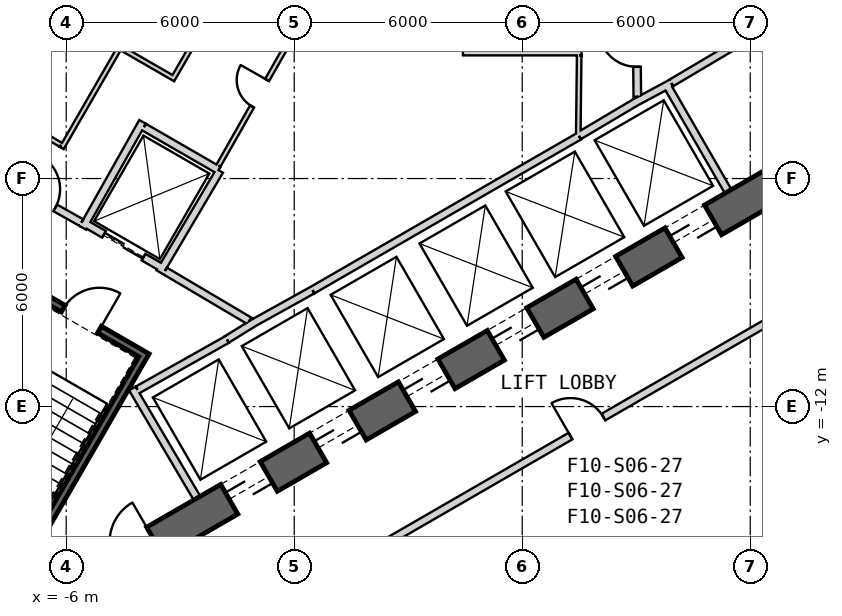
"""IFC4 building model, lengths in metres.
Left out: names, types, materials, properties, quantities, classifications, styles, units other than length and angle.
Written with IfcOpenShell. Run it as: python <this file> out.ifc"""

import sys

from ifc_helpers import new_model, si_unit, direction, frame, frame_2d, origin, place, context, subcontext, project, spatial, rectangle, extrude, element, fill, save


model = new_model("IFC4")
c1 = context("Model", 3, precision=1e-05, world=origin(), true_north=direction((0.0, 1.0)))
c2 = subcontext(c1, "Body", "Model", "MODEL_VIEW")
j1 = project(units=[si_unit("LENGTHUNIT", "METRE"), si_unit("PLANEANGLEUNIT", "RADIAN")], contexts=[c1])
p1 = place(None, origin())
s1 = spatial("IfcSite", under=j1, at=p1, CompositionType="ELEMENT")
p2 = place(p1, origin())
s2 = spatial("IfcBuilding", under=s1, at=p2, CompositionType="ELEMENT")
p3 = place(p2, frame((0.0, 0.0, 119.3)))
s3 = spatial("IfcBuildingStorey", under=s2, at=p3, CompositionType="ELEMENT", Elevation=119.3)
p4 = place(p3, frame((-7.825, -17.97, 0.0), z_axis=(0.0, 0.0, 1.0), x_axis=(0.866028369851, 0.499994862586, 0.0)))
e1 = element("IfcWall", 1, at=p4, inside=s3, PredefinedType="SHEAR", context=c2, shape_type="SweptSolid", body=[
    extrude(rectangle(XDim=31.523, YDim=0.9, at=frame_2d((15.762, 0.0))), origin(), (0.0, 0.0, 1.0), 4.1),
])
p5 = place(p4, frame((7.062, 0.0, 0.0)))
e2 = element("IfcOpeningElement", 2, at=p5, cuts=e1, PredefinedType="OPENING", context=c2, shape_type="SweptSolid", body=[
    extrude(rectangle(XDim=1.2, YDim=2.4, at=frame_2d((0.6, 1.2))), frame((0.0, 0.46, 0.0), z_axis=(0.0, -1.0, 0.0), x_axis=(1.0, 0.0, 0.0)), (0.0, 0.0, 1.0), 0.92),
])
p6 = place(p4, frame((9.762, 0.0, 0.0)))
e3 = element("IfcOpeningElement", 3, at=p6, cuts=e1, PredefinedType="OPENING", context=c2, shape_type="SweptSolid", body=[
    extrude(rectangle(XDim=1.2, YDim=2.4, at=frame_2d((0.6, 1.2))), frame((0.0, 0.46, 0.0), z_axis=(0.0, -1.0, 0.0), x_axis=(1.0, 0.0, 0.0)), (0.0, 0.0, 1.0), 0.92),
])
p7 = place(p4, frame((12.462, 0.0, 0.0)))
e4 = element("IfcOpeningElement", 4, at=p7, cuts=e1, PredefinedType="OPENING", context=c2, shape_type="SweptSolid", body=[
    extrude(rectangle(XDim=1.2, YDim=2.4, at=frame_2d((0.6, 1.2))), frame((0.0, 0.46, 0.0), z_axis=(0.0, -1.0, 0.0), x_axis=(1.0, 0.0, 0.0)), (0.0, 0.0, 1.0), 0.92),
])
p8 = place(p4, frame((15.162, 0.0, 0.0)))
e5 = element("IfcOpeningElement", 5, at=p8, cuts=e1, PredefinedType="OPENING", context=c2, shape_type="SweptSolid", body=[
    extrude(rectangle(XDim=1.2, YDim=2.4, at=frame_2d((0.6, 1.2))), frame((0.0, 0.46, 0.0), z_axis=(0.0, -1.0, 0.0), x_axis=(1.0, 0.0, 0.0)), (0.0, 0.0, 1.0), 0.92),
])
p9 = place(p4, frame((17.862, 0.0, 0.0)))
e6 = element("IfcOpeningElement", 6, at=p9, cuts=e1, PredefinedType="OPENING", context=c2, shape_type="SweptSolid", body=[
    extrude(rectangle(XDim=1.2, YDim=2.4, at=frame_2d((0.6, 1.2))), frame((0.0, 0.46, 0.0), z_axis=(0.0, -1.0, 0.0), x_axis=(1.0, 0.0, 0.0)), (0.0, 0.0, 1.0), 0.92),
])
p10 = place(p4, frame((20.562, 0.0, 0.0)))
e7 = element("IfcOpeningElement", 7, at=p10, cuts=e1, PredefinedType="OPENING", context=c2, shape_type="SweptSolid", body=[
    extrude(rectangle(XDim=1.2, YDim=2.4, at=frame_2d((0.6, 1.2))), frame((0.0, 0.46, 0.0), z_axis=(0.0, -1.0, 0.0), x_axis=(1.0, 0.0, 0.0)), (0.0, 0.0, 1.0), 0.92),
])
p11 = place(p4, frame((26.712, 0.0, 0.0)))
e8 = element("IfcOpeningElement", 8, at=p11, cuts=e1, PredefinedType="OPENING", context=c2, shape_type="SweptSolid", body=[
    extrude(rectangle(XDim=1.2, YDim=2.4, at=frame_2d((0.6, 1.2))), frame((0.0, 0.46, 0.0), z_axis=(0.0, -1.0, 0.0), x_axis=(1.0, 0.0, 0.0)), (0.0, 0.0, 1.0), 0.92),
])
p12 = place(p4, frame((3.612, 0.0, 0.0)))
e9 = element("IfcOpeningElement", 9, at=p12, cuts=e1, PredefinedType="OPENING", context=c2, shape_type="SweptSolid", body=[
    extrude(rectangle(XDim=1.2, YDim=2.4, at=frame_2d((0.6, 1.2))), frame((0.0, 0.46, 0.0), z_axis=(0.0, -1.0, 0.0), x_axis=(1.0, 0.0, 0.0)), (0.0, 0.0, 1.0), 0.92),
])
p13 = place(p3, frame((0.483, -8.936, 0.0), z_axis=(0.0, 0.0, 1.0), x_axis=(0.866030989016, 0.499990325971, 0.0)))
e10 = element("IfcWall", 10, at=p13, inside=s3, PredefinedType="PLUMBINGWALL", context=c2, shape_type="SweptSolid", body=[
    extrude(rectangle(XDim=8.1, YDim=0.2, at=frame_2d((4.05, 0.0))), origin(), (0.0, 0.0, 1.0), 3.8),
])
p14 = place(p3, frame((9.795, -3.525, 0.0), z_axis=(0.0, 0.0, 1.0), x_axis=(0.499984717929, -0.866034226713, 0.0)))
e11 = element("IfcWall", 11, at=p14, inside=s3, PredefinedType="PLUMBINGWALL", context=c2, shape_type="SweptSolid", body=[
    extrude(rectangle(XDim=3.25, YDim=0.2, at=frame_2d((1.625, 0.0))), origin(), (0.0, 0.0, 1.0), 3.8),
])
p15 = place(p3, frame((8.974, -3.999, 0.0), z_axis=(0.0, 0.0, 1.0), x_axis=(0.880907015104, 0.473289373154, 0.0)))
e12 = element("IfcWall", 12, at=p15, inside=s3, PredefinedType="PLUMBINGWALL", context=c2, shape_type="SweptSolid", body=[
    extrude(rectangle(XDim=1.078, YDim=0.2, at=frame_2d((0.539, 0.0))), origin(), (0.0, 0.0, 1.0), 3.8),
])
p16 = place(p3, frame((7.493, -4.878, 0.0), z_axis=(0.0, 0.0, 1.0), x_axis=(0.859981807212, 0.510324691999, 0.0)))
e13 = element("IfcWall", 13, at=p16, inside=s3, PredefinedType="PLUMBINGWALL", context=c2, shape_type="SweptSolid", body=[
    extrude(rectangle(XDim=1.845, YDim=0.2, at=frame_2d((0.922, 0.0))), origin(), (0.0, 0.0, 1.0), 3.8),
])
p17 = place(p3, frame((-2.558, -14.409, 0.0), z_axis=(0.0, 0.0, 1.0), x_axis=(-0.507997497166, 0.861358544901, 0.0)))
e14 = element("IfcWall", 14, at=p17, inside=s3, PredefinedType="PLUMBINGWALL", context=c2, shape_type="SweptSolid", body=[
    extrude(rectangle(XDim=3.35, YDim=0.2, at=frame_2d((1.675, 0.0))), origin(), (0.0, 0.0, 1.0), 3.8),
])
p18 = place(p3, frame((-1.769, -10.237, 0.0), z_axis=(0.0, 0.0, 1.0), x_axis=(-0.871534483978, -0.490334215854, 0.0)))
e15 = element("IfcWall", 15, at=p18, inside=s3, PredefinedType="PLUMBINGWALL", context=c2, shape_type="SweptSolid", body=[
    extrude(rectangle(XDim=2.7, YDim=0.2, at=frame_2d((1.35, 0.0))), origin(), (0.0, 0.0, 1.0), 3.8),
])
p19 = place(p3, frame((-1.024, -9.771, 0.0), z_axis=(0.0, 0.0, 1.0), x_axis=(-0.850348075135, -0.526220629693, 0.0)))
e16 = element("IfcWall", 16, at=p19, inside=s3, PredefinedType="PLUMBINGWALL", context=c2, shape_type="SweptSolid", body=[
    extrude(rectangle(XDim=0.878, YDim=0.2, at=frame_2d((0.439, 0.0))), origin(), (0.0, 0.0, 1.0), 3.8),
])
p20 = place(p3, frame((-1.13, -9.831, 0.0), z_axis=(0.0, 0.0, 1.0), x_axis=(0.874269620932, 0.485440655401, 0.0)))
e17 = element("IfcWall", 17, at=p20, inside=s3, PredefinedType="PLUMBINGWALL", context=c2, shape_type="SweptSolid", body=[
    extrude(rectangle(XDim=1.845, YDim=0.2, at=frame_2d((0.922, 0.0))), origin(), (0.0, 0.0, 1.0), 3.8),
])
p21 = place(p3, frame((-3.905, -10.563, -0.3), z_axis=(0.0, 0.0, 1.0), x_axis=(-0.500012932018, -0.866017937352, 0.0)))
e18 = element("IfcWall", 18, at=p21, inside=s3, PredefinedType="SHEAR", context=c2, shape_type="SweptSolid", body=[
    extrude(rectangle(XDim=8.1, YDim=0.2, at=frame_2d((4.05, 0.0))), origin(), (0.0, 0.0, 1.0), 4.1),
])
p22 = place(p3, frame((-4.041, -10.599, -0.3), z_axis=(0.0, 0.0, 1.0), x_axis=(-0.866047807691, 0.499961193289, 0.0)))
e19 = element("IfcWall", 19, at=p22, inside=s3, PredefinedType="SHEAR", context=c2, shape_type="SweptSolid", body=[
    extrude(rectangle(XDim=3.6, YDim=0.2, at=frame_2d((1.8, 0.0))), origin(), (0.0, 0.0, 1.0), 4.1),
])
p23 = place(p22, frame((1.25, 0.0, 0.3)))
e20 = element("IfcOpeningElement", 20, at=p23, cuts=e19, PredefinedType="OPENING", context=c2, shape_type="SweptSolid", body=[
    extrude(rectangle(XDim=1.1, YDim=2.1, at=frame_2d((0.55, 1.05))), frame((0.0, 0.11, 0.0), z_axis=(0.0, -1.0, 0.0), x_axis=(1.0, 0.0, 0.0)), (0.0, 0.0, 1.0), 0.22),
])
p24 = place(p3, frame((-3.446, -8.368, 0.0), z_axis=(0.0, 0.0, 1.0), x_axis=(-0.866024647952, 0.500001309137, 0.0)))
e21 = element("IfcWall", 21, at=p24, inside=s3, PredefinedType="PLUMBINGWALL", context=c2, shape_type="SweptSolid", body=[
    extrude(rectangle(XDim=2.4, YDim=0.2, at=frame_2d((1.2, 0.0))), origin(), (0.0, 0.0, 1.0), 3.8),
])
p25 = place(p24, frame((0.6, 0.0, 0.0)))
e22 = element("IfcOpeningElement", 22, at=p25, cuts=e21, PredefinedType="OPENING", context=c2, shape_type="SweptSolid", body=[
    extrude(rectangle(XDim=1.2, YDim=2.4, at=frame_2d((0.6, 1.2))), frame((0.0, 0.11, 0.0), z_axis=(0.0, -1.0, 0.0), x_axis=(1.0, 0.0, 0.0)), (0.0, 0.0, 1.0), 0.22),
])
p26 = place(p3, frame((-1.961, -5.796, 0.0), z_axis=(0.0, 0.0, 1.0), x_axis=(-0.508647062354, -0.860975125052, 0.0)))
e23 = element("IfcWall", 23, at=p26, inside=s3, PredefinedType="PLUMBINGWALL", context=c2, shape_type="SweptSolid", body=[
    extrude(rectangle(XDim=3.1, YDim=0.2, at=frame_2d((1.55, 0.0))), origin(), (0.0, 0.0, 1.0), 3.8),
])
p27 = place(p3, frame((-3.99, -4.509, 0.0), z_axis=(0.0, 0.0, 1.0), x_axis=(-0.491358283181, -0.870957540612, 0.0)))
e24 = element("IfcWall", 24, at=p27, inside=s3, PredefinedType="PLUMBINGWALL", context=c2, shape_type="SweptSolid", body=[
    extrude(rectangle(XDim=3.2, YDim=0.2, at=frame_2d((1.6, 0.0))), origin(), (0.0, 0.0, 1.0), 3.8),
])
p28 = place(p3, frame((-3.953, -4.646, 0.0), z_axis=(0.0, 0.0, 1.0), x_axis=(0.866065302921, -0.4999308863, 0.0)))
e25 = element("IfcWall", 25, at=p28, inside=s3, PredefinedType="PLUMBINGWALL", context=c2, shape_type="SweptSolid", body=[
    extrude(rectangle(XDim=2.264, YDim=0.2, at=frame_2d((1.132, 0.0))), origin(), (0.0, 0.0, 1.0), 3.8),
])
p29 = place(p3, frame((12.245, -2.109, 0.0), z_axis=(0.0, 0.0, 1.0), x_axis=(-0.860414880418, -0.509594185166, 0.0)))
e26 = element("IfcWall", 26, at=p29, inside=s3, PredefinedType="PARTITIONING", context=c2, shape_type="SweptSolid", body=[
    extrude(rectangle(XDim=2.7, YDim=0.2, at=frame_2d((1.35, 0.0))), origin(), (0.0, 0.0, 1.0), 3.8),
])
p30 = place(p3, frame((13.758, -4.99, 0.0), z_axis=(0.0, 0.0, 1.0), x_axis=(-0.491993409184, 0.87059892334, 0.0)))
e27 = element("IfcWall", 27, at=p30, inside=s3, PredefinedType="PARTITIONING", context=c2, shape_type="SweptSolid", body=[
    extrude(rectangle(XDim=3.15, YDim=0.2, at=frame_2d((1.575, 0.0))), origin(), (0.0, 0.0, 1.0), 3.8),
])
p31 = place(p30, frame((1.175, 0.0, 0.0)))
e28 = element("IfcOpeningElement", 28, at=p31, cuts=e27, PredefinedType="OPENING", context=c2, shape_type="SweptSolid", body=[
    extrude(rectangle(XDim=0.8, YDim=2.1, at=frame_2d((0.4, 1.05))), frame((0.0, 0.11, 0.0), z_axis=(0.0, -1.0, 0.0), x_axis=(1.0, 0.0, 0.0)), (0.0, 0.0, 1.0), 0.22),
])
p32 = place(p3, frame((9.029, -3.851, 0.0), z_axis=(0.0, 0.0, 1.0), x_axis=(-0.010783593937, 0.99994185536, 0.0)))
e29 = element("IfcWall", 29, at=p32, inside=s3, PredefinedType="PARTITIONING", context=c2, shape_type="SweptSolid", body=[
    extrude(rectangle(XDim=2.581, YDim=0.2, at=frame_2d((1.291, 0.0))), origin(), (0.0, 0.0, 1.0), 3.8),
])
p33 = place(p32, frame((0.791, 0.0, 0.0)))
e30 = element("IfcOpeningElement", 30, at=p33, cuts=e29, PredefinedType="OPENING", context=c2, shape_type="SweptSolid", body=[
    extrude(rectangle(XDim=1.0, YDim=2.1, at=frame_2d((0.5, 1.05))), frame((0.0, 0.11, 0.0), z_axis=(0.0, -1.0, 0.0), x_axis=(1.0, 0.0, 0.0)), (0.0, 0.0, 1.0), 0.22),
])
p34 = place(p3, frame((-3.401, -8.43, 0.0), z_axis=(0.0, 0.0, 1.0), x_axis=(0.860615607571, -0.509255118781, 0.0)))
e31 = element("IfcWall", 31, at=p34, inside=s3, PredefinedType="PARTITIONING", context=c2, shape_type="SweptSolid", body=[
    extrude(rectangle(XDim=2.581, YDim=0.2, at=frame_2d((1.29, 0.0))), origin(), (0.0, 0.0, 1.0), 3.8),
])
p35 = place(p3, frame((-7.849, -5.894, 0.0), z_axis=(0.0, 0.0, 1.0), x_axis=(0.871363259478, -0.490638431059, 0.0)))
e32 = element("IfcWall", 32, at=p35, inside=s3, PredefinedType="PARTITIONING", context=c2, shape_type="SweptSolid", body=[
    extrude(rectangle(XDim=2.581, YDim=0.2, at=frame_2d((1.291, 0.0))), origin(), (0.0, 0.0, 1.0), 3.8),
])
p36 = place(p35, frame((0.791, 0.0, 0.0)))
e33 = element("IfcOpeningElement", 33, at=p36, cuts=e32, PredefinedType="OPENING", context=c2, shape_type="SweptSolid", body=[
    extrude(rectangle(XDim=1.0, YDim=2.1, at=frame_2d((0.5, 1.05))), frame((0.0, 0.11, 0.0), z_axis=(0.0, -1.0, 0.0), x_axis=(1.0, 0.0, 0.0)), (0.0, 0.0, 1.0), 0.22),
])
p37 = place(p3, frame((0.224, -1.761, 0.0), z_axis=(0.0, 0.0, 1.0), x_axis=(-0.494327216836, -0.869275907118, 0.0)))
e34 = element("IfcWall", 34, at=p37, inside=s3, PredefinedType="PARTITIONING", context=c2, shape_type="SweptSolid", body=[
    extrude(rectangle(XDim=4.487, YDim=0.12, at=frame_2d((2.244, 0.0))), origin(), (0.0, 0.0, 1.0), 3.8),
])
p38 = place(p37, frame((1.895, 0.0, 0.0)))
e35 = element("IfcOpeningElement", 35, at=p38, cuts=e34, PredefinedType="OPENING", context=c2, shape_type="SweptSolid", body=[
    extrude(rectangle(XDim=0.8, YDim=2.1, at=frame_2d((0.4, 1.05))), frame((0.0, 0.07, 0.0), z_axis=(0.0, -1.0, 0.0), x_axis=(1.0, 0.0, 0.0)), (0.0, 0.0, 1.0), 0.14),
])
p39 = place(p3, frame((4.5, -2.76, 0.0), z_axis=(0.0, 0.0, 1.0), x_axis=(0.0, 1.0, 0.0)))
e36 = element("IfcWall", 36, at=p39, inside=s3, PredefinedType="PARTITIONING", context=c2, shape_type="SweptSolid", body=[
    extrude(rectangle(XDim=1.625, YDim=0.12, at=frame_2d((0.812, 0.0))), origin(), (0.0, 0.0, 1.0), 3.8),
])
p40 = place(p3, frame((7.56, -2.7, 0.0), z_axis=(0.0, 0.0, 1.0), x_axis=(-1.0, 0.0, 0.0)))
e37 = element("IfcWall", 37, at=p40, inside=s3, PredefinedType="PARTITIONING", context=c2, shape_type="SweptSolid", body=[
    extrude(rectangle(XDim=3.0, YDim=0.12, at=frame_2d((1.5, 0.0))), origin(), (0.0, 0.0, 1.0), 3.8),
])
p41 = place(p3, frame((7.475, -4.865, 0.0), z_axis=(0.0, 0.0, 1.0), x_axis=(0.011716133148, 0.999931363757, 0.0)))
e38 = element("IfcWall", 38, at=p41, inside=s3, PredefinedType="PARTITIONING", context=c2, shape_type="SweptSolid", body=[
    extrude(rectangle(XDim=2.105, YDim=0.12, at=frame_2d((1.052, 0.0))), origin(), (0.0, 0.0, 1.0), 3.8),
])
p42 = place(p3, frame((-3.211, -3.412, 0.0), z_axis=(0.0, 0.0, 1.0), x_axis=(0.499983190554, 0.866035108505, 0.0)))
e39 = element("IfcWall", 39, at=p42, inside=s3, PredefinedType="PARTITIONING", context=c2, shape_type="SweptSolid", body=[
    extrude(rectangle(XDim=3.026, YDim=0.12, at=frame_2d((1.513, 0.0))), origin(), (0.0, 0.0, 1.0), 3.8),
])
p43 = place(p42, frame((1.143, 0.0, 0.0)))
e40 = element("IfcOpeningElement", 40, at=p43, cuts=e39, PredefinedType="OPENING", context=c2, shape_type="SweptSolid", body=[
    extrude(rectangle(XDim=0.8, YDim=2.1, at=frame_2d((0.4, 1.05))), frame((0.0, 0.07, 0.0), z_axis=(0.0, -1.0, 0.0), x_axis=(1.0, 0.0, 0.0)), (0.0, 0.0, 1.0), 0.14),
])
p44 = place(p3, frame((-4.64, -2.517, 0.0), z_axis=(0.0, 0.0, 1.0), x_axis=(0.866015446554, -0.500017246033, 0.0)))
e41 = element("IfcWall", 41, at=p44, inside=s3, PredefinedType="PARTITIONING", context=c2, shape_type="SweptSolid", body=[
    extrude(rectangle(XDim=1.625, YDim=0.12, at=frame_2d((0.812, 0.0))), origin(), (0.0, 0.0, 1.0), 3.8),
])
p45 = place(p3, frame((-6.118, -5.197, 0.0), z_axis=(0.0, 0.0, 1.0), x_axis=(0.499990139034, 0.866031096941, 0.0)))
e42 = element("IfcWall", 42, at=p45, inside=s3, PredefinedType="PARTITIONING", context=c2, shape_type="SweptSolid", body=[
    extrude(rectangle(XDim=3.0, YDim=0.12, at=frame_2d((1.5, 0.0))), origin(), (0.0, 0.0, 1.0), 3.8),
])
p46 = place(p3, frame((-7.95, -4.041, 0.0), z_axis=(0.0, 0.0, 1.0), x_axis=(0.860112457103, -0.510104461004, 0.0)))
e43 = element("IfcWall", 43, at=p46, inside=s3, PredefinedType="PARTITIONING", context=c2, shape_type="SweptSolid", body=[
    extrude(rectangle(XDim=2.104, YDim=0.12, at=frame_2d((1.052, 0.0))), origin(), (0.0, 0.0, 1.0), 3.8),
])
p47 = place(p3, frame((-6.852, -20.93, 0.0), z_axis=(0.0, 0.0, 1.0), x_axis=(0.866023703603, 0.500002944789, 0.0)))
e44 = element("IfcWall", 44, at=p47, inside=s3, PredefinedType="PARTITIONING", context=c2, shape_type="SweptSolid", body=[
    extrude(rectangle(XDim=32.599, YDim=0.2, at=frame_2d((16.299, 0.0))), origin(), (0.0, 0.0, 1.0), 2.98),
])
p48 = place(p47, frame((27.463, 0.0, 0.0)))
e45 = element("IfcOpeningElement", 45, at=p48, cuts=e44, PredefinedType="OPENING", context=c2, shape_type="SweptSolid", body=[
    extrude(rectangle(XDim=1.0, YDim=2.1, at=frame_2d((0.5, 1.05))), frame((0.0, 0.11, 0.0), z_axis=(0.0, -1.0, 0.0), x_axis=(1.0, 0.0, 0.0)), (0.0, 0.0, 1.0), 0.22),
])
p49 = place(p47, frame((16.307, 0.0, 0.0)))
e46 = element("IfcOpeningElement", 46, at=p49, cuts=e44, PredefinedType="OPENING", context=c2, shape_type="SweptSolid", body=[
    extrude(rectangle(XDim=1.0, YDim=2.1, at=frame_2d((0.5, 1.05))), frame((0.0, 0.11, 0.0), z_axis=(0.0, -1.0, 0.0), x_axis=(1.0, 0.0, 0.0)), (0.0, 0.0, 1.0), 0.22),
])
p50 = place(p47, frame((4.694, 0.0, 0.0)))
e47 = element("IfcOpeningElement", 47, at=p50, cuts=e44, PredefinedType="OPENING", context=c2, shape_type="SweptSolid", body=[
    extrude(rectangle(XDim=1.0, YDim=2.1, at=frame_2d((0.5, 1.05))), frame((0.0, 0.11, 0.0), z_axis=(0.0, -1.0, 0.0), x_axis=(1.0, 0.0, 0.0)), (0.0, 0.0, 1.0), 0.22),
])
p51 = place(p33, origin())
e48 = element("IfcDoor", 48, at=p51, inside=s3, OperationType="SINGLE_SWING_RIGHT", PredefinedType="USERDEFINED", context=c2, shape_type="SweptSolid", body=[
    extrude(rectangle(XDim=1.0, YDim=2.1, at=frame_2d((0.5, 1.05))), frame((0.0, 0.025, 0.0), z_axis=(0.0, -1.0, 0.0), x_axis=(1.0, 0.0, 0.0)), (0.0, 0.0, 1.0), 0.05),
])
fill(e30, e48)
p52 = place(p23, origin())
e49 = element("IfcDoor", 49, at=p52, inside=s3, OperationType="SINGLE_SWING_RIGHT", PredefinedType="USERDEFINED", context=c2, shape_type="SweptSolid", body=[
    extrude(rectangle(XDim=1.1, YDim=2.1, at=frame_2d((0.55, 1.05))), frame((0.0, 0.025, 0.0), z_axis=(0.0, -1.0, 0.0), x_axis=(1.0, 0.0, 0.0)), (0.0, 0.0, 1.0), 0.05),
])
fill(e20, e49)
p53 = place(p36, origin())
e50 = element("IfcDoor", 50, at=p53, inside=s3, OperationType="SINGLE_SWING_RIGHT", PredefinedType="USERDEFINED", context=c2, shape_type="SweptSolid", body=[
    extrude(rectangle(XDim=1.0, YDim=2.1, at=frame_2d((0.5, 1.05))), frame((0.0, 0.025, 0.0), z_axis=(0.0, -1.0, 0.0), x_axis=(1.0, 0.0, 0.0)), (0.0, 0.0, 1.0), 0.05),
])
fill(e33, e50)
p54 = place(p25, origin())
e51 = element("IfcDoor", 51, at=p54, inside=s3, OperationType="SLIDING_TO_LEFT", PredefinedType="USERDEFINED", context=c2, shape_type="SweptSolid", body=[
    extrude(rectangle(XDim=1.2, YDim=2.4, at=frame_2d((0.6, 1.2))), frame((0.0, 0.025, 0.0), z_axis=(0.0, -1.0, 0.0), x_axis=(1.0, 0.0, 0.0)), (0.0, 0.0, 1.0), 0.05),
])
fill(e22, e51)
p55 = place(p38, origin())
e52 = element("IfcDoor", 52, at=p55, inside=s3, OperationType="SINGLE_SWING_LEFT", PredefinedType="USERDEFINED", context=c2, shape_type="SweptSolid", body=[
    extrude(rectangle(XDim=0.8, YDim=2.1, at=frame_2d((0.4, 1.05))), frame((0.0, 0.025, 0.0), z_axis=(0.0, -1.0, 0.0), x_axis=(1.0, 0.0, 0.0)), (0.0, 0.0, 1.0), 0.05),
])
fill(e35, e52)
p56 = place(p49, origin())
e53 = element("IfcDoor", 53, at=p56, inside=s3, OperationType="SINGLE_SWING_RIGHT", PredefinedType="USERDEFINED", context=c2, shape_type="SweptSolid", body=[
    extrude(rectangle(XDim=1.0, YDim=2.1, at=frame_2d((0.5, 1.05))), frame((0.0, 0.025, 0.0), z_axis=(0.0, -1.0, 0.0), x_axis=(1.0, 0.0, 0.0)), (0.0, 0.0, 1.0), 0.05),
])
fill(e46, e53)
p57 = place(p5, origin())
e54 = element("IfcDoor", 54, at=p57, inside=s3, OperationType="SLIDING_TO_LEFT", PredefinedType="USERDEFINED", context=c2, shape_type="SweptSolid", body=[
    extrude(rectangle(XDim=1.2, YDim=2.4, at=frame_2d((0.6, 1.2))), frame((0.0, 0.025, 0.0), z_axis=(0.0, -1.0, 0.0), x_axis=(1.0, 0.0, 0.0)), (0.0, 0.0, 1.0), 0.05),
])
fill(e2, e54)
p58 = place(p6, origin())
e55 = element("IfcDoor", 55, at=p58, inside=s3, OperationType="SLIDING_TO_LEFT", PredefinedType="USERDEFINED", context=c2, shape_type="SweptSolid", body=[
    extrude(rectangle(XDim=1.2, YDim=2.4, at=frame_2d((0.6, 1.2))), frame((0.0, 0.025, 0.0), z_axis=(0.0, -1.0, 0.0), x_axis=(1.0, 0.0, 0.0)), (0.0, 0.0, 1.0), 0.05),
])
fill(e3, e55)
p59 = place(p7, origin())
e56 = element("IfcDoor", 56, at=p59, inside=s3, OperationType="SLIDING_TO_LEFT", PredefinedType="USERDEFINED", context=c2, shape_type="SweptSolid", body=[
    extrude(rectangle(XDim=1.2, YDim=2.4, at=frame_2d((0.6, 1.2))), frame((0.0, 0.025, 0.0), z_axis=(0.0, -1.0, 0.0), x_axis=(1.0, 0.0, 0.0)), (0.0, 0.0, 1.0), 0.05),
])
fill(e4, e56)
p60 = place(p8, origin())
e57 = element("IfcDoor", 57, at=p60, inside=s3, OperationType="SLIDING_TO_LEFT", PredefinedType="USERDEFINED", context=c2, shape_type="SweptSolid", body=[
    extrude(rectangle(XDim=1.2, YDim=2.4, at=frame_2d((0.6, 1.2))), frame((0.0, 0.025, 0.0), z_axis=(0.0, -1.0, 0.0), x_axis=(1.0, 0.0, 0.0)), (0.0, 0.0, 1.0), 0.05),
])
fill(e5, e57)
p61 = place(p9, origin())
e58 = element("IfcDoor", 58, at=p61, inside=s3, OperationType="SLIDING_TO_LEFT", PredefinedType="USERDEFINED", context=c2, shape_type="SweptSolid", body=[
    extrude(rectangle(XDim=1.2, YDim=2.4, at=frame_2d((0.6, 1.2))), frame((0.0, 0.025, 0.0), z_axis=(0.0, -1.0, 0.0), x_axis=(1.0, 0.0, 0.0)), (0.0, 0.0, 1.0), 0.05),
])
fill(e6, e58)
p62 = place(p10, origin())
e59 = element("IfcDoor", 59, at=p62, inside=s3, OperationType="SLIDING_TO_LEFT", PredefinedType="USERDEFINED", context=c2, shape_type="SweptSolid", body=[
    extrude(rectangle(XDim=1.2, YDim=2.4, at=frame_2d((0.6, 1.2))), frame((0.0, 0.025, 0.0), z_axis=(0.0, -1.0, 0.0), x_axis=(1.0, 0.0, 0.0)), (0.0, 0.0, 1.0), 0.05),
])
fill(e7, e59)
save(model, sys.argv[1])
